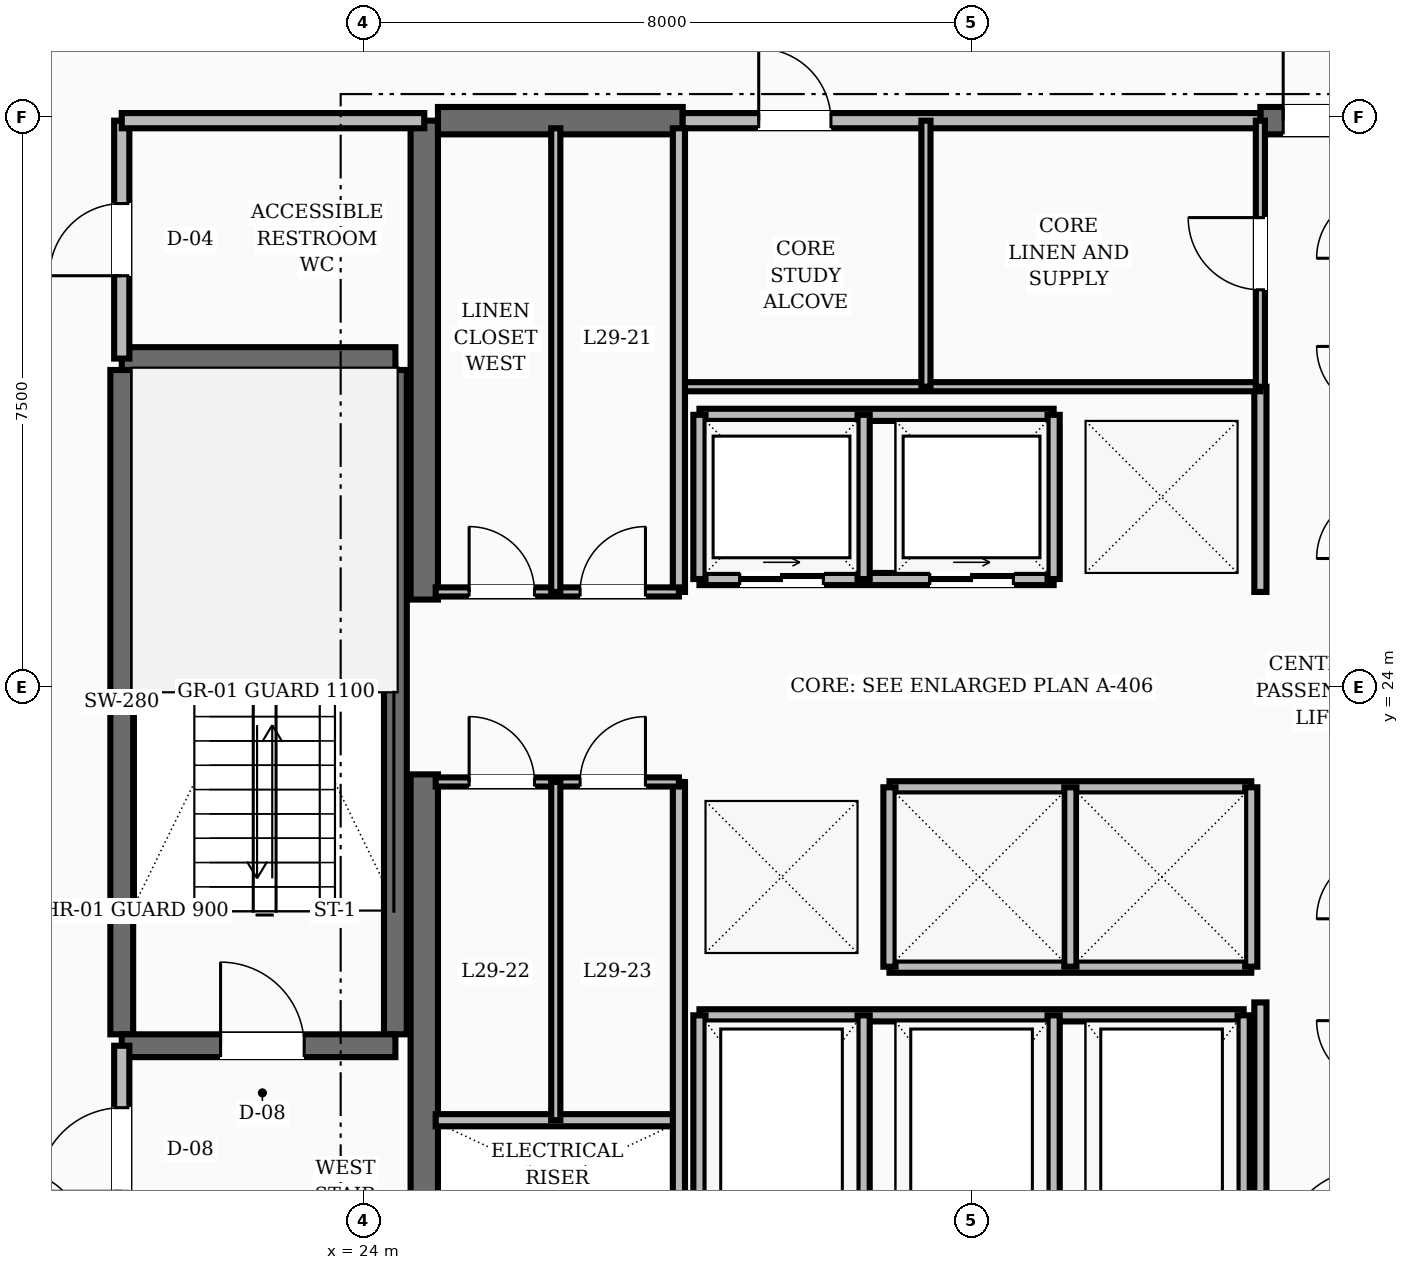
"""IFC4 building model, lengths in metres.
Left out: names, types, materials, properties, quantities, classifications, styles, units other than length and angle.
Written with IfcOpenShell. Run it as: python <this file> out.ifc"""

import sys

from ifc_helpers import new_model, si_unit, direction, frame, frame_2d, origin, place, context, subcontext, project, spatial, rectangle, extrude, element, fill, save


model = new_model("IFC4")
c1 = context("Model", 3, precision=1e-05, world=origin(), true_north=direction((0.0, 1.0)))
c2 = subcontext(c1, "Body", "Model", "MODEL_VIEW")
j1 = project(units=[si_unit("LENGTHUNIT", "METRE"), si_unit("PLANEANGLEUNIT", "RADIAN")], contexts=[c1])
p1 = place(None, origin())
s1 = spatial("IfcSite", under=j1, at=p1, CompositionType="ELEMENT")
p2 = place(p1, origin())
s2 = spatial("IfcBuilding", under=s1, at=p2, CompositionType="ELEMENT")
p3 = place(p2, frame((0.0, 0.0, 117.2)))
s3 = spatial("IfcBuildingStorey", under=s2, at=p3, CompositionType="ELEMENT", Elevation=117.2)
for number, where, z_axis, x_axis in (
    (1, (24.8, 16.55, 0.0), (0.0, 0.0, 1.0), (0.0, 1.0, 0.0)),
    (2, (24.8, 25.15, 0.0), (0.0, 0.0, 1.0), (0.0, 1.0, 0.0)),
):
    element("IfcWall", number, at=place(p3, frame(where, z_axis=z_axis, x_axis=x_axis)), inside=s3, PredefinedType="SHEAR", context=c2, shape_type="SweptSolid", body=[
        extrude(rectangle(XDim=6.3, YDim=0.36, at=frame_2d((3.15, 0.0))), origin(), (0.0, 0.0, 1.0), 3.6),
    ])
p4 = place(p3, frame((24.98, 31.45, 0.0), z_axis=(0.0, 0.0, 1.0), x_axis=(1.0, 0.0, 0.0)))
e3 = element("IfcWall", 3, at=p4, inside=s3, PredefinedType="SHEAR", context=c2, shape_type="SweptSolid", body=[
    extrude(rectangle(XDim=3.22, YDim=0.36, at=frame_2d((1.61, 0.0))), origin(), (0.0, 0.0, 1.0), 3.6),
])
p5 = place(p3, frame((35.8, 31.45, 0.0), z_axis=(0.0, 0.0, 1.0), x_axis=(1.0, 0.0, 0.0)))
e4 = element("IfcWall", 4, at=p5, inside=s3, PredefinedType="SHEAR", context=c2, shape_type="SweptSolid", body=[
    extrude(rectangle(XDim=3.22, YDim=0.36, at=frame_2d((1.61, 0.0))), origin(), (0.0, 0.0, 1.0), 3.6),
])
p6 = place(p5, frame((0.3, 0.0, 0.0)))
e5 = element("IfcOpeningElement", 5, at=p6, cuts=e4, PredefinedType="OPENING", context=c2, shape_type="SweptSolid", body=[
    extrude(rectangle(XDim=1.1, YDim=2.1, at=frame_2d((0.55, 1.05))), frame((0.0, 0.19, 0.0), z_axis=(0.0, -1.0, 0.0), x_axis=(1.0, 0.0, 0.0)), (0.0, 0.0, 1.0), 0.38),
])
for number, where, z_axis, x_axis in (
    (6, (20.82, 19.43, 0.0), (0.0, 0.0, 1.0), (0.0, 1.0, 0.0)),
    (7, (24.42, 19.43, 0.0), (0.0, 0.0, 1.0), (0.0, 1.0, 0.0)),
):
    element("IfcWall", number, at=place(p3, frame(where, z_axis=z_axis, x_axis=x_axis)), inside=s3, PredefinedType="SHEAR", context=c2, shape_type="SweptSolid", body=[
        extrude(rectangle(XDim=8.74, YDim=0.3, at=frame_2d((4.37, 0.0))), origin(), (0.0, 0.0, 1.0), 3.6),
    ])
p7 = place(p3, frame((20.82, 19.28, 0.0), z_axis=(0.0, 0.0, 1.0), x_axis=(1.0, 0.0, 0.0)))
e8 = element("IfcWall", 8, at=p7, inside=s3, PredefinedType="SHEAR", context=c2, shape_type="SweptSolid", body=[
    extrude(rectangle(XDim=3.6, YDim=0.3, at=frame_2d((1.8, 0.0))), origin(), (0.0, 0.0, 1.0), 3.6),
])
p8 = place(p7, frame((1.3, 0.0, 0.0)))
e9 = element("IfcOpeningElement", 9, at=p8, cuts=e8, PredefinedType="OPENING", context=c2, shape_type="SweptSolid", body=[
    extrude(rectangle(XDim=1.1, YDim=2.1, at=frame_2d((0.55, 1.05))), frame((0.0, 0.16, 0.0), z_axis=(0.0, -1.0, 0.0), x_axis=(1.0, 0.0, 0.0)), (0.0, 0.0, 1.0), 0.32),
])
p9 = place(p3, frame((20.82, 28.32, 0.0), z_axis=(0.0, 0.0, 1.0), x_axis=(1.0, 0.0, 0.0)))
e10 = element("IfcWall", 10, at=p9, inside=s3, PredefinedType="SHEAR", context=c2, shape_type="SweptSolid", body=[
    extrude(rectangle(XDim=3.6, YDim=0.3, at=frame_2d((1.8, 0.0))), origin(), (0.0, 0.0, 1.0), 3.6),
])
p10 = place(p3, frame((20.82, 16.55, 0.0), z_axis=(0.0, 0.0, 1.0), x_axis=(0.0, 1.0, 0.0)))
e11 = element("IfcWall", 11, at=p10, inside=s3, PredefinedType="SOLIDWALL", context=c2, shape_type="SweptSolid", body=[
    extrude(rectangle(XDim=2.73, YDim=0.2, at=frame_2d((1.365, 0.0))), origin(), (0.0, 0.0, 1.0), 2.8),
])
p11 = place(p10, frame((0.815, 0.0, 0.0)))
e12 = element("IfcOpeningElement", 12, at=p11, cuts=e11, PredefinedType="OPENING", context=c2, shape_type="SweptSolid", body=[
    extrude(rectangle(XDim=1.1, YDim=2.1, at=frame_2d((0.55, 1.05))), frame((0.0, 0.11, 0.0), z_axis=(0.0, -1.0, 0.0), x_axis=(1.0, 0.0, 0.0)), (0.0, 0.0, 1.0), 0.22),
])
p12 = place(p3, frame((20.82, 28.32, 0.0), z_axis=(0.0, 0.0, 1.0), x_axis=(0.0, 1.0, 0.0)))
e13 = element("IfcWall", 13, at=p12, inside=s3, PredefinedType="SOLIDWALL", context=c2, shape_type="SweptSolid", body=[
    extrude(rectangle(XDim=3.13, YDim=0.2, at=frame_2d((1.565, 0.0))), origin(), (0.0, 0.0, 1.0), 2.8),
])
p13 = place(p12, frame((1.09, 0.0, 0.0)))
e14 = element("IfcOpeningElement", 14, at=p13, cuts=e13, PredefinedType="OPENING", context=c2, shape_type="SweptSolid", body=[
    extrude(rectangle(XDim=0.95, YDim=2.1, at=frame_2d((0.475, 1.05))), frame((0.0, 0.11, 0.0), z_axis=(0.0, -1.0, 0.0), x_axis=(1.0, 0.0, 0.0)), (0.0, 0.0, 1.0), 0.22),
])
p14 = place(p3, frame((20.82, 31.45, 0.0), z_axis=(0.0, 0.0, 1.0), x_axis=(1.0, 0.0, 0.0)))
e15 = element("IfcWall", 15, at=p14, inside=s3, PredefinedType="SOLIDWALL", context=c2, shape_type="SweptSolid", body=[
    extrude(rectangle(XDim=3.98, YDim=0.2, at=frame_2d((1.99, 0.0))), origin(), (0.0, 0.0, 1.0), 2.8),
])
p15 = place(p3, frame((35.8, 16.55, 0.0), z_axis=(0.0, 0.0, 1.0), x_axis=(0.0, 1.0, 0.0)))
e16 = element("IfcWall", 16, at=p15, inside=s3, PredefinedType="SOLIDWALL", context=c2, shape_type="SweptSolid", body=[
    extrude(rectangle(XDim=3.3, YDim=0.16, at=frame_2d((1.65, 0.0))), origin(), (0.0, 0.0, 1.0), 2.8),
])
p16 = place(p3, frame((35.8, 25.25, 0.0), z_axis=(0.0, 0.0, 1.0), x_axis=(0.0, 1.0, 0.0)))
e17 = element("IfcWall", 17, at=p16, inside=s3, PredefinedType="SOLIDWALL", context=c2, shape_type="SweptSolid", body=[
    extrude(rectangle(XDim=2.7, YDim=0.16, at=frame_2d((1.35, 0.0))), origin(), (0.0, 0.0, 1.0), 2.8),
])
p17 = place(p3, frame((28.42, 25.42, 0.0), z_axis=(0.0, 0.0, 1.0), x_axis=(1.0, 0.0, 0.0)))
e18 = element("IfcWall", 18, at=p17, inside=s3, PredefinedType="SOLIDWALL", context=c2, shape_type="SweptSolid", body=[
    extrude(rectangle(XDim=4.66, YDim=0.16, at=frame_2d((2.33, 0.0))), origin(), (0.0, 0.0, 1.0), 2.8),
])
p18 = place(p17, frame((0.53, 0.0, 0.0)))
e19 = element("IfcOpeningElement", 19, at=p18, cuts=e18, PredefinedType="OPENING", context=c2, shape_type="SweptSolid", body=[
    extrude(rectangle(XDim=1.1, YDim=2.15, at=frame_2d((0.55, 1.075))), frame((0.0, 0.09, 0.0), z_axis=(0.0, -1.0, 0.0), x_axis=(1.0, 0.0, 0.0)), (0.0, 0.0, 1.0), 0.18),
])
p19 = place(p17, frame((3.03, 0.0, 0.0)))
e20 = element("IfcOpeningElement", 20, at=p19, cuts=e18, PredefinedType="OPENING", context=c2, shape_type="SweptSolid", body=[
    extrude(rectangle(XDim=1.1, YDim=2.15, at=frame_2d((0.55, 1.075))), frame((0.0, 0.09, 0.0), z_axis=(0.0, -1.0, 0.0), x_axis=(1.0, 0.0, 0.0)), (0.0, 0.0, 1.0), 0.18),
])
p20 = place(p3, frame((28.42, 27.58, 0.0), z_axis=(0.0, 0.0, 1.0), x_axis=(1.0, 0.0, 0.0)))
e21 = element("IfcWall", 21, at=p20, inside=s3, PredefinedType="SOLIDWALL", context=c2, shape_type="SweptSolid", body=[
    extrude(rectangle(XDim=4.66, YDim=0.16, at=frame_2d((2.33, 0.0))), origin(), (0.0, 0.0, 1.0), 2.8),
])
for number, where, z_axis, x_axis in (
    (22, (28.42, 25.42, 0.0), (0.0, 0.0, 1.0), (0.0, 1.0, 0.0)),
    (23, (30.58, 25.42, 0.0), (0.0, 0.0, 1.0), (0.0, 1.0, 0.0)),
    (24, (33.08, 25.42, 0.0), (0.0, 0.0, 1.0), (0.0, 1.0, 0.0)),
):
    element("IfcWall", number, at=place(p3, frame(where, z_axis=z_axis, x_axis=x_axis)), inside=s3, PredefinedType="SOLIDWALL", context=c2, shape_type="SweptSolid", body=[
        extrude(rectangle(XDim=2.16, YDim=0.16, at=frame_2d((1.08, 0.0))), origin(), (0.0, 0.0, 1.0), 2.8),
    ])
for number, where, z_axis, x_axis in (
    (25, (30.92, 22.68, 0.0), (0.0, 0.0, 1.0), (1.0, 0.0, 0.0)),
    (26, (30.92, 20.32, 0.0), (0.0, 0.0, 1.0), (1.0, 0.0, 0.0)),
):
    element("IfcWall", number, at=place(p3, frame(where, z_axis=z_axis, x_axis=x_axis)), inside=s3, PredefinedType="SOLIDWALL", context=c2, shape_type="SweptSolid", body=[
        extrude(rectangle(XDim=4.76, YDim=0.16, at=frame_2d((2.38, 0.0))), origin(), (0.0, 0.0, 1.0), 2.8),
    ])
for number, where, z_axis, x_axis in (
    (27, (30.92, 20.32, 0.0), (0.0, 0.0, 1.0), (0.0, 1.0, 0.0)),
    (28, (33.3, 20.32, 0.0), (0.0, 0.0, 1.0), (0.0, 1.0, 0.0)),
    (29, (35.68, 20.32, 0.0), (0.0, 0.0, 1.0), (0.0, 1.0, 0.0)),
):
    element("IfcWall", number, at=place(p3, frame(where, z_axis=z_axis, x_axis=x_axis)), inside=s3, PredefinedType="SOLIDWALL", context=c2, shape_type="SweptSolid", body=[
        extrude(rectangle(XDim=2.36, YDim=0.16, at=frame_2d((1.18, 0.0))), origin(), (0.0, 0.0, 1.0), 2.8),
    ])
p21 = place(p3, frame((28.42, 19.68, 0.0), z_axis=(0.0, 0.0, 1.0), x_axis=(1.0, 0.0, 0.0)))
e30 = element("IfcWall", 30, at=p21, inside=s3, PredefinedType="SOLIDWALL", context=c2, shape_type="SweptSolid", body=[
    extrude(rectangle(XDim=7.16, YDim=0.16, at=frame_2d((3.58, 0.0))), origin(), (0.0, 0.0, 1.0), 2.8),
])
for number, where, z_axis, x_axis in (
    (31, (28.42, 16.92, 0.0), (0.0, 0.0, 1.0), (0.0, 1.0, 0.0)),
    (32, (30.58, 16.92, 0.0), (0.0, 0.0, 1.0), (0.0, 1.0, 0.0)),
    (33, (33.08, 16.92, 0.0), (0.0, 0.0, 1.0), (0.0, 1.0, 0.0)),
    (34, (35.58, 16.92, 0.0), (0.0, 0.0, 1.0), (0.0, 1.0, 0.0)),
):
    element("IfcWall", number, at=place(p3, frame(where, z_axis=z_axis, x_axis=x_axis)), inside=s3, PredefinedType="SOLIDWALL", context=c2, shape_type="SweptSolid", body=[
        extrude(rectangle(XDim=2.76, YDim=0.16, at=frame_2d((1.38, 0.0))), origin(), (0.0, 0.0, 1.0), 2.8),
    ])
p22 = place(p3, frame((28.2, 31.45, 0.0), z_axis=(0.0, 0.0, 1.0), x_axis=(1.0, 0.0, 0.0)))
e35 = element("IfcWall", 35, at=p22, inside=s3, PredefinedType="SOLIDWALL", context=c2, shape_type="SweptSolid", body=[
    extrude(rectangle(XDim=7.6, YDim=0.2, at=frame_2d((3.8, 0.0))), origin(), (0.0, 0.0, 1.0), 2.8),
])
p23 = place(p22, frame((1.0, 0.0, 0.0)))
e36 = element("IfcOpeningElement", 36, at=p23, cuts=e35, PredefinedType="OPENING", context=c2, shape_type="SweptSolid", body=[
    extrude(rectangle(XDim=0.95, YDim=2.1, at=frame_2d((0.475, 1.05))), frame((0.0, 0.11, 0.0), z_axis=(0.0, -1.0, 0.0), x_axis=(1.0, 0.0, 0.0)), (0.0, 0.0, 1.0), 0.22),
])
p24 = place(p3, frame((28.2, 27.95, 0.0), z_axis=(0.0, 0.0, 1.0), x_axis=(1.0, 0.0, 0.0)))
e37 = element("IfcWall", 37, at=p24, inside=s3, PredefinedType="PARTITIONING", context=c2, shape_type="SweptSolid", body=[
    extrude(rectangle(XDim=7.6, YDim=0.12, at=frame_2d((3.8, 0.0))), origin(), (0.0, 0.0, 1.0), 2.8),
])
p25 = place(p3, frame((35.8, 27.95, 0.0), z_axis=(0.0, 0.0, 1.0), x_axis=(0.0, 1.0, 0.0)))
e38 = element("IfcWall", 38, at=p25, inside=s3, PredefinedType="PARTITIONING", context=c2, shape_type="SweptSolid", body=[
    extrude(rectangle(XDim=3.5, YDim=0.12, at=frame_2d((1.75, 0.0))), origin(), (0.0, 0.0, 1.0), 2.8),
])
p26 = place(p25, frame((1.275, 0.0, 0.0)))
e39 = element("IfcOpeningElement", 39, at=p26, cuts=e38, PredefinedType="OPENING", context=c2, shape_type="SweptSolid", body=[
    extrude(rectangle(XDim=0.95, YDim=2.1, at=frame_2d((0.475, 1.05))), frame((0.0, 0.07, 0.0), z_axis=(0.0, -1.0, 0.0), x_axis=(1.0, 0.0, 0.0)), (0.0, 0.0, 1.0), 0.14),
])
p27 = place(p3, frame((31.4, 27.95, 0.0), z_axis=(0.0, 0.0, 1.0), x_axis=(0.0, 1.0, 0.0)))
e40 = element("IfcWall", 40, at=p27, inside=s3, PredefinedType="PARTITIONING", context=c2, shape_type="SweptSolid", body=[
    extrude(rectangle(XDim=3.5, YDim=0.12, at=frame_2d((1.75, 0.0))), origin(), (0.0, 0.0, 1.0), 2.8),
])
p28 = place(p3, frame((24.95, 18.3, 0.0), z_axis=(0.0, 0.0, 1.0), x_axis=(1.0, 0.0, 0.0)))
e41 = element("IfcWall", 41, at=p28, inside=s3, PredefinedType="SOLIDWALL", context=c2, shape_type="SweptSolid", body=[
    extrude(rectangle(XDim=3.2, YDim=0.16, at=frame_2d((1.6, 0.0))), origin(), (0.0, 0.0, 1.0), 2.8),
])
p29 = place(p3, frame((28.15, 16.7, 0.0), z_axis=(0.0, 0.0, 1.0), x_axis=(0.0, 1.0, 0.0)))
e42 = element("IfcWall", 42, at=p29, inside=s3, PredefinedType="SOLIDWALL", context=c2, shape_type="SweptSolid", body=[
    extrude(rectangle(XDim=6.05, YDim=0.16, at=frame_2d((3.025, 0.0))), origin(), (0.0, 0.0, 1.0), 2.8),
])
p30 = place(p3, frame((28.15, 25.25, 0.0), z_axis=(0.0, 0.0, 1.0), x_axis=(0.0, 1.0, 0.0)))
e43 = element("IfcWall", 43, at=p30, inside=s3, PredefinedType="SOLIDWALL", context=c2, shape_type="SweptSolid", body=[
    extrude(rectangle(XDim=6.1, YDim=0.16, at=frame_2d((3.05, 0.0))), origin(), (0.0, 0.0, 1.0), 2.8),
])
p31 = place(p3, frame((24.95, 25.25, 0.0), z_axis=(0.0, 0.0, 1.0), x_axis=(1.0, 0.0, 0.0)))
e44 = element("IfcWall", 44, at=p31, inside=s3, PredefinedType="PARTITIONING", context=c2, shape_type="SweptSolid", body=[
    extrude(rectangle(XDim=3.2, YDim=0.12, at=frame_2d((1.6, 0.0))), origin(), (0.0, 0.0, 1.0), 2.8),
])
p32 = place(p31, frame((0.44, 0.0, 0.0)))
e45 = element("IfcOpeningElement", 45, at=p32, cuts=e44, PredefinedType="OPENING", context=c2, shape_type="SweptSolid", body=[
    extrude(rectangle(XDim=0.86, YDim=2.1, at=frame_2d((0.43, 1.05))), frame((0.0, 0.07, 0.0), z_axis=(0.0, -1.0, 0.0), x_axis=(1.0, 0.0, 0.0)), (0.0, 0.0, 1.0), 0.14),
])
p33 = place(p31, frame((1.9, 0.0, 0.0)))
e46 = element("IfcOpeningElement", 46, at=p33, cuts=e44, PredefinedType="OPENING", context=c2, shape_type="SweptSolid", body=[
    extrude(rectangle(XDim=0.86, YDim=2.1, at=frame_2d((0.43, 1.05))), frame((0.0, 0.07, 0.0), z_axis=(0.0, -1.0, 0.0), x_axis=(1.0, 0.0, 0.0)), (0.0, 0.0, 1.0), 0.14),
])
p34 = place(p3, frame((24.95, 22.75, 0.0), z_axis=(0.0, 0.0, 1.0), x_axis=(1.0, 0.0, 0.0)))
e47 = element("IfcWall", 47, at=p34, inside=s3, PredefinedType="PARTITIONING", context=c2, shape_type="SweptSolid", body=[
    extrude(rectangle(XDim=3.2, YDim=0.12, at=frame_2d((1.6, 0.0))), origin(), (0.0, 0.0, 1.0), 2.8),
])
p35 = place(p34, frame((0.44, 0.0, 0.0)))
e48 = element("IfcOpeningElement", 48, at=p35, cuts=e47, PredefinedType="OPENING", context=c2, shape_type="SweptSolid", body=[
    extrude(rectangle(XDim=0.86, YDim=2.1, at=frame_2d((0.43, 1.05))), frame((0.0, 0.07, 0.0), z_axis=(0.0, -1.0, 0.0), x_axis=(1.0, 0.0, 0.0)), (0.0, 0.0, 1.0), 0.14),
])
p36 = place(p34, frame((1.9, 0.0, 0.0)))
e49 = element("IfcOpeningElement", 49, at=p36, cuts=e47, PredefinedType="OPENING", context=c2, shape_type="SweptSolid", body=[
    extrude(rectangle(XDim=0.86, YDim=2.1, at=frame_2d((0.43, 1.05))), frame((0.0, 0.07, 0.0), z_axis=(0.0, -1.0, 0.0), x_axis=(1.0, 0.0, 0.0)), (0.0, 0.0, 1.0), 0.14),
])
p37 = place(p3, frame((26.53, 25.25, 0.0), z_axis=(0.0, 0.0, 1.0), x_axis=(0.0, 1.0, 0.0)))
e50 = element("IfcWall", 50, at=p37, inside=s3, PredefinedType="PARTITIONING", context=c2, shape_type="SweptSolid", body=[
    extrude(rectangle(XDim=6.1, YDim=0.12, at=frame_2d((3.05, 0.0))), origin(), (0.0, 0.0, 1.0), 2.8),
])
p38 = place(p3, frame((26.53, 18.3, 0.0), z_axis=(0.0, 0.0, 1.0), x_axis=(0.0, 1.0, 0.0)))
e51 = element("IfcWall", 51, at=p38, inside=s3, PredefinedType="PARTITIONING", context=c2, shape_type="SweptSolid", body=[
    extrude(rectangle(XDim=4.45, YDim=0.12, at=frame_2d((2.225, 0.0))), origin(), (0.0, 0.0, 1.0), 2.8),
])
p39 = place(p8, origin())
e52 = element("IfcDoor", 52, at=p39, inside=s3, OperationType="SINGLE_SWING_LEFT", PredefinedType="DOOR", context=c2, shape_type="SweptSolid", body=[
    extrude(rectangle(XDim=1.1, YDim=2.1, at=frame_2d((0.55, 1.05))), frame((0.0, 0.025, 0.0), z_axis=(0.0, -1.0, 0.0), x_axis=(1.0, 0.0, 0.0)), (0.0, 0.0, 1.0), 0.05),
])
fill(e9, e52)
p40 = place(p11, origin())
e53 = element("IfcDoor", 53, at=p40, inside=s3, OperationType="SINGLE_SWING_LEFT", PredefinedType="DOOR", context=c2, shape_type="SweptSolid", body=[
    extrude(rectangle(XDim=1.1, YDim=2.1, at=frame_2d((0.55, 1.05))), frame((0.0, 0.025, 0.0), z_axis=(0.0, -1.0, 0.0), x_axis=(1.0, 0.0, 0.0)), (0.0, 0.0, 1.0), 0.05),
])
fill(e12, e53)
p41 = place(p13, origin())
e54 = element("IfcDoor", 54, at=p41, inside=s3, OperationType="SINGLE_SWING_LEFT", PredefinedType="DOOR", context=c2, shape_type="SweptSolid", body=[
    extrude(rectangle(XDim=0.95, YDim=2.1, at=frame_2d((0.475, 1.05))), frame((0.0, 0.025, 0.0), z_axis=(0.0, -1.0, 0.0), x_axis=(1.0, 0.0, 0.0)), (0.0, 0.0, 1.0), 0.05),
])
fill(e14, e54)
p42 = place(p6, origin())
e55 = element("IfcDoor", 55, at=p42, inside=s3, OperationType="SINGLE_SWING_LEFT", PredefinedType="DOOR", context=c2, shape_type="SweptSolid", body=[
    extrude(rectangle(XDim=1.1, YDim=2.1, at=frame_2d((0.55, 1.05))), frame((0.0, 0.025, 0.0), z_axis=(0.0, -1.0, 0.0), x_axis=(1.0, 0.0, 0.0)), (0.0, 0.0, 1.0), 0.05),
])
fill(e5, e55)
p43 = place(p18, origin())
e56 = element("IfcDoor", 56, at=p43, inside=s3, OperationType="SLIDING_TO_RIGHT", PredefinedType="DOOR", context=c2, shape_type="SweptSolid", body=[
    extrude(rectangle(XDim=1.1, YDim=2.15, at=frame_2d((0.55, 1.075))), frame((0.0, 0.025, 0.0), z_axis=(0.0, -1.0, 0.0), x_axis=(1.0, 0.0, 0.0)), (0.0, 0.0, 1.0), 0.05),
])
fill(e19, e56)
p44 = place(p19, origin())
e57 = element("IfcDoor", 57, at=p44, inside=s3, OperationType="SLIDING_TO_RIGHT", PredefinedType="DOOR", context=c2, shape_type="SweptSolid", body=[
    extrude(rectangle(XDim=1.1, YDim=2.15, at=frame_2d((0.55, 1.075))), frame((0.0, 0.025, 0.0), z_axis=(0.0, -1.0, 0.0), x_axis=(1.0, 0.0, 0.0)), (0.0, 0.0, 1.0), 0.05),
])
fill(e20, e57)
p45 = place(p23, origin())
e58 = element("IfcDoor", 58, at=p45, inside=s3, OperationType="SINGLE_SWING_LEFT", PredefinedType="DOOR", context=c2, shape_type="SweptSolid", body=[
    extrude(rectangle(XDim=0.95, YDim=2.1, at=frame_2d((0.475, 1.05))), frame((0.0, 0.025, 0.0), z_axis=(0.0, -1.0, 0.0), x_axis=(1.0, 0.0, 0.0)), (0.0, 0.0, 1.0), 0.05),
])
fill(e36, e58)
p46 = place(p26, origin())
e59 = element("IfcDoor", 59, at=p46, inside=s3, OperationType="SINGLE_SWING_RIGHT", PredefinedType="DOOR", context=c2, shape_type="SweptSolid", body=[
    extrude(rectangle(XDim=0.95, YDim=2.1, at=frame_2d((0.475, 1.05))), frame((0.0, 0.025, 0.0), z_axis=(0.0, -1.0, 0.0), x_axis=(1.0, 0.0, 0.0)), (0.0, 0.0, 1.0), 0.05),
])
fill(e39, e59)
p47 = place(p32, origin())
e60 = element("IfcDoor", 60, at=p47, inside=s3, OperationType="SINGLE_SWING_LEFT", PredefinedType="DOOR", context=c2, shape_type="SweptSolid", body=[
    extrude(rectangle(XDim=0.86, YDim=2.1, at=frame_2d((0.43, 1.05))), frame((0.0, 0.025, 0.0), z_axis=(0.0, -1.0, 0.0), x_axis=(1.0, 0.0, 0.0)), (0.0, 0.0, 1.0), 0.05),
])
fill(e45, e60)
p48 = place(p33, origin())
e61 = element("IfcDoor", 61, at=p48, inside=s3, OperationType="SINGLE_SWING_RIGHT", PredefinedType="DOOR", context=c2, shape_type="SweptSolid", body=[
    extrude(rectangle(XDim=0.86, YDim=2.1, at=frame_2d((0.43, 1.05))), frame((0.0, 0.025, 0.0), z_axis=(0.0, -1.0, 0.0), x_axis=(1.0, 0.0, 0.0)), (0.0, 0.0, 1.0), 0.05),
])
fill(e46, e61)
p49 = place(p35, origin())
e62 = element("IfcDoor", 62, at=p49, inside=s3, OperationType="SINGLE_SWING_LEFT", PredefinedType="DOOR", context=c2, shape_type="SweptSolid", body=[
    extrude(rectangle(XDim=0.86, YDim=2.1, at=frame_2d((0.43, 1.05))), frame((0.0, 0.025, 0.0), z_axis=(0.0, -1.0, 0.0), x_axis=(1.0, 0.0, 0.0)), (0.0, 0.0, 1.0), 0.05),
])
fill(e48, e62)
p50 = place(p36, origin())
e63 = element("IfcDoor", 63, at=p50, inside=s3, OperationType="SINGLE_SWING_RIGHT", PredefinedType="DOOR", context=c2, shape_type="SweptSolid", body=[
    extrude(rectangle(XDim=0.86, YDim=2.1, at=frame_2d((0.43, 1.05))), frame((0.0, 0.025, 0.0), z_axis=(0.0, -1.0, 0.0), x_axis=(1.0, 0.0, 0.0)), (0.0, 0.0, 1.0), 0.05),
])
fill(e49, e63)
save(model, sys.argv[1])
